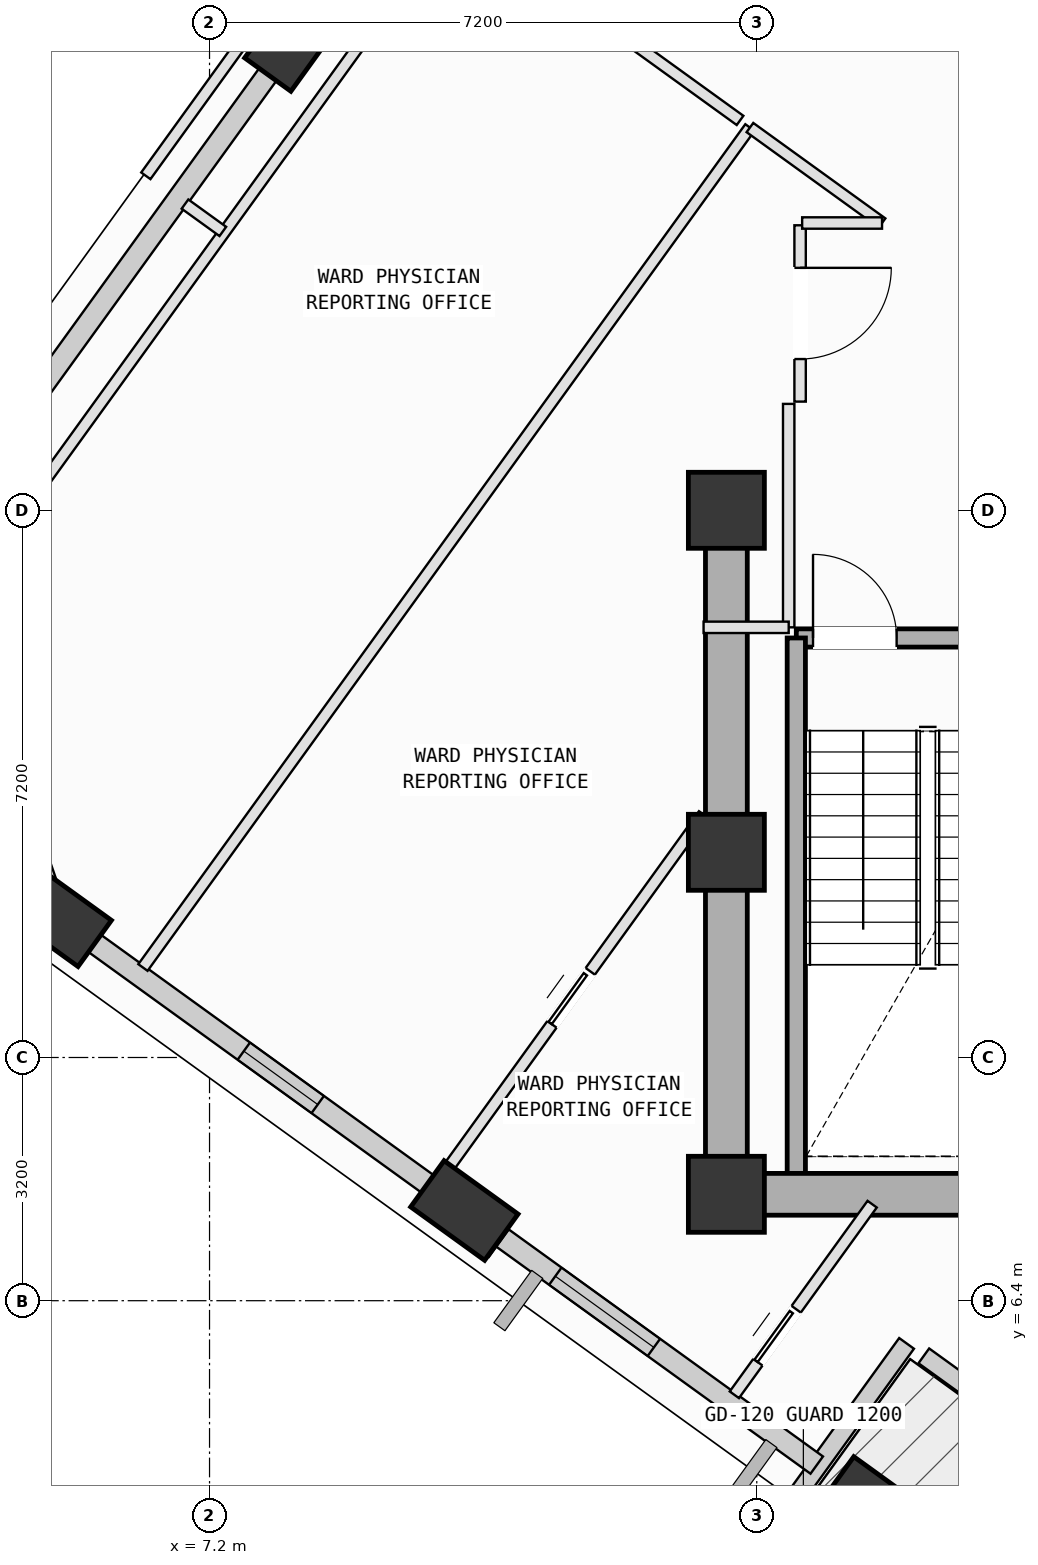
"""IFC4 building model, lengths in metres.
Left out: names, types, materials, properties, quantities, classifications, styles, units other than length and angle.
Written with IfcOpenShell. Run it as: python <this file> out.ifc"""

import sys

from ifc_helpers import new_model, si_unit, direction, frame, frame_2d, origin, origin_2d, place, context, subcontext, project, spatial, rectangle, extrude, element, fill, save


model = new_model("IFC4")
c1 = context("Model", 3, precision=1e-05, world=origin(), true_north=direction((0.0, 1.0)))
c2 = subcontext(c1, "Body", "Model", "MODEL_VIEW")
j1 = project(units=[si_unit("LENGTHUNIT", "METRE"), si_unit("PLANEANGLEUNIT", "RADIAN")], contexts=[c1])
p1 = place(None, origin())
s1 = spatial("IfcSite", under=j1, at=p1, CompositionType="ELEMENT")
p2 = place(p1, origin())
s2 = spatial("IfcBuilding", under=s1, at=p2, CompositionType="ELEMENT")
p3 = place(p2, frame((0.0, 0.0, 255.2)))
s3 = spatial("IfcBuildingStorey", under=s2, at=p3, CompositionType="ELEMENT", Elevation=255.2)
for number, where, z_axis, x_axis in (
    (1, (14.0, 7.8, 0.0), (0.0, 0.0, 1.0), (1.0, 0.0, 0.0)),
    (2, (14.0, 12.3, 0.0), (0.0, 0.0, 1.0), (1.0, 0.0, 0.0)),
    (3, (14.0, 16.8, 0.0), (0.0, 0.0, 1.0), (1.0, 0.0, 0.0)),
):
    element("IfcColumn", number, at=place(p3, frame(where, z_axis=z_axis, x_axis=x_axis)), inside=s3, PredefinedType="COLUMN", context=c2, shape_type="SweptSolid", body=[
        extrude(rectangle(XDim=1.0, YDim=1.0, at=origin_2d()), origin(), (0.0, 0.0, 1.0), 4.0),
    ])
p4 = place(p3, frame((8.318, 23.02, 0.002), z_axis=(0.008202176681, -0.10413726542, 0.994529111816), x_axis=(0.520560631231, 0.849616141392, 0.084670192506)))
e4 = element("IfcColumn", 4, at=p4, inside=s3, PredefinedType="COLUMN", context=c2, shape_type="SweptSolid", body=[
    extrude(rectangle(XDim=1.2, YDim=0.75, at=origin_2d()), origin(), (0.0, 0.0, 1.0), 4.018),
])
p5 = place(p3, frame((5.203, 11.452, 0.002), z_axis=(0.055855526664, -0.116254615693, 0.991647631203), x_axis=(-0.98211534436, 0.172463303398, 0.075537138904)))
e5 = element("IfcColumn", 5, at=p5, inside=s3, PredefinedType="COLUMN", context=c2, shape_type="SweptSolid", body=[
    extrude(rectangle(XDim=1.2, YDim=0.75, at=origin_2d()), origin(), (0.0, 0.0, 1.0), 4.03),
])
p6 = place(p3, frame((10.553, 7.587, 0.002), z_axis=(0.071580718062, -0.094268165991, 0.992970147428), x_axis=(-0.997228265917, -0.02702229823, 0.069322298389)))
e6 = element("IfcColumn", 6, at=p6, inside=s3, PredefinedType="COLUMN", context=c2, shape_type="SweptSolid", body=[
    extrude(rectangle(XDim=1.2, YDim=0.75, at=origin_2d()), origin(), (0.0, 0.0, 1.0), 4.025),
])
p7 = place(p3, frame((15.943, 3.692, 0.002), z_axis=(0.087525830484, -0.071987264184, 0.993557780299), x_axis=(-0.964292743084, -0.256387070129, 0.066371499197)))
e7 = element("IfcColumn", 7, at=p7, inside=s3, PredefinedType="COLUMN", context=c2, shape_type="SweptSolid", body=[
    extrude(rectangle(XDim=1.2, YDim=0.75, at=origin_2d()), origin(), (0.0, 0.0, 1.0), 4.022),
])
p8 = place(p3, frame((22.239, 1.598, 0.0), z_axis=(0.0, 0.0, 1.0), x_axis=(-0.810564518145, 0.585649350656, 0.0)))
e8 = element("IfcWall", 8, at=p8, inside=s3, PredefinedType="SOLIDWALL", context=c2, shape_type="SweptSolid", body=[
    extrude(rectangle(XDim=6.96, YDim=0.24, at=frame_2d((3.48, 0.0))), origin(), (0.0, 0.0, 1.0), 3.265),
])
p9 = place(p8, frame((2.485, 0.0, 0.0)))
e9 = element("IfcOpeningElement", 9, at=p9, cuts=e8, PredefinedType="OPENING", context=c2, shape_type="SweptSolid", body=[
    extrude(rectangle(XDim=1.1, YDim=2.15, at=frame_2d((0.55, 1.075))), frame((0.0, 0.13, 0.0), z_axis=(0.0, -1.0, 0.0), x_axis=(1.0, 0.0, 0.0)), (0.0, 0.0, 1.0), 0.26),
])
p10 = place(p3, frame((16.371, 5.838, 0.0), z_axis=(0.0, 0.0, 1.0), x_axis=(-0.585718716233, -0.810514395587, 0.0)))
e10 = element("IfcWall", 10, at=p10, inside=s3, PredefinedType="SOLIDWALL", context=c2, shape_type="SweptSolid", body=[
    extrude(rectangle(XDim=2.5, YDim=0.24, at=frame_2d((1.25, 0.0))), origin(), (0.0, 0.0, 1.0), 3.265),
])
p11 = place(p3, frame((3.622, 16.521, 0.0), z_axis=(0.0, 0.0, 1.0), x_axis=(0.585672755105, 0.810547607441, 0.0)))
e11 = element("IfcWall", 11, at=p11, inside=s3, PredefinedType="SOLIDWALL", context=c2, shape_type="SweptSolid", body=[
    extrude(rectangle(XDim=7.485, YDim=0.28, at=frame_2d((3.742, 0.0))), origin(), (0.0, 0.0, 1.0), 3.265),
])
p12 = place(p3, frame((5.158, 11.583, 0.0), z_axis=(0.0, 0.0, 1.0), x_axis=(-0.324440430391, 0.945906130188, 0.0)))
e12 = element("IfcWall", 12, at=p12, inside=s3, PredefinedType="SOLIDWALL", context=c2, shape_type="SweptSolid", body=[
    extrude(rectangle(XDim=4.408, YDim=0.28, at=frame_2d((2.204, 0.0))), origin(), (0.0, 0.0, 1.0), 3.265),
])
p13 = place(p3, frame((10.42, 7.683, 0.0), z_axis=(0.0, 0.0, 1.0), x_axis=(-0.810541185411, 0.585681642834, 0.0)))
e13 = element("IfcWall", 13, at=p13, inside=s3, PredefinedType="SOLIDWALL", context=c2, shape_type="SweptSolid", body=[
    extrude(rectangle(XDim=5.831, YDim=0.28, at=frame_2d((2.915, 0.0))), origin(), (0.0, 0.0, 1.0), 3.265),
])
p14 = place(p13, frame((2.217, 0.0, 0.75)))
e14 = element("IfcOpeningElement", 14, at=p14, cuts=e13, PredefinedType="OPENING", context=c2, shape_type="SweptSolid", body=[
    extrude(rectangle(XDim=1.2, YDim=1.75, at=frame_2d((0.6, 0.875))), frame((0.0, 0.15, 0.0), z_axis=(0.0, -1.0, 0.0), x_axis=(1.0, 0.0, 0.0)), (0.0, 0.0, 1.0), 0.3),
])
p15 = place(p3, frame((15.189, 4.237, 0.0), z_axis=(0.0, 0.0, 1.0), x_axis=(-0.810568140664, 0.585644336898, 0.0)))
e15 = element("IfcWall", 15, at=p15, inside=s3, PredefinedType="SOLIDWALL", context=c2, shape_type="SweptSolid", body=[
    extrude(rectangle(XDim=5.101, YDim=0.28, at=frame_2d((2.55, 0.0))), origin(), (0.0, 0.0, 1.0), 3.245),
])
p16 = place(p15, frame((2.644, 0.0, 0.75)))
e16 = element("IfcOpeningElement", 16, at=p16, cuts=e15, PredefinedType="OPENING", context=c2, shape_type="SweptSolid", body=[
    extrude(rectangle(XDim=1.6, YDim=1.95, at=frame_2d((0.8, 0.975))), frame((0.0, 0.15, 0.0), z_axis=(0.0, -1.0, 0.0), x_axis=(1.0, 0.0, 0.0)), (0.0, 0.0, 1.0), 0.3),
])
p17 = place(p3, frame((14.92, 15.12, 0.0), z_axis=(0.0, 0.0, 1.0), x_axis=(1.0, 0.0, 0.0)))
e17 = element("IfcWall", 17, at=p17, inside=s3, PredefinedType="SOLIDWALL", context=c2, shape_type="SweptSolid", body=[
    extrude(rectangle(XDim=3.46, YDim=0.24, at=frame_2d((1.73, 0.0))), origin(), (0.0, 0.0, 1.0), 3.78),
])
p18 = place(p17, frame((0.22, 0.0, 0.0)))
e18 = element("IfcOpeningElement", 18, at=p18, cuts=e17, PredefinedType="OPENING", context=c2, shape_type="SweptSolid", body=[
    extrude(rectangle(XDim=1.1, YDim=2.15, at=frame_2d((0.55, 1.075))), frame((0.0, 0.13, 0.0), z_axis=(0.0, -1.0, 0.0), x_axis=(1.0, 0.0, 0.0)), (0.0, 0.0, 1.0), 0.26),
])
p19 = place(p3, frame((14.92, 8.075, 0.0), z_axis=(0.0, 0.0, 1.0), x_axis=(0.0, 1.0, 0.0)))
e19 = element("IfcWall", 19, at=p19, inside=s3, PredefinedType="SOLIDWALL", context=c2, shape_type="SweptSolid", body=[
    extrude(rectangle(XDim=7.045, YDim=0.24, at=frame_2d((3.522, 0.0))), origin(), (0.0, 0.0, 1.0), 3.78),
])
p20 = place(p3, frame((14.0, 7.8, 0.0), z_axis=(0.0, 0.0, 1.0), x_axis=(1.0, 0.0, 0.0)))
e20 = element("IfcWall", 20, at=p20, inside=s3, PredefinedType="SHEAR", context=c2, shape_type="SweptSolid", body=[
    extrude(rectangle(XDim=10.8, YDim=0.55, at=frame_2d((5.4, 0.0))), origin(), (0.0, 0.0, 1.0), 3.78),
])
p21 = place(p3, frame((14.0, 16.8, 0.0), z_axis=(0.0, 0.0, 1.0), x_axis=(0.0, -1.0, 0.0)))
e21 = element("IfcWall", 21, at=p21, inside=s3, PredefinedType="SHEAR", context=c2, shape_type="SweptSolid", body=[
    extrude(rectangle(XDim=9.0, YDim=0.55, at=frame_2d((4.5, 0.0))), origin(), (0.0, 0.0, 1.0), 3.78),
])
p22 = place(p3, frame((14.105, 5.162, 0.0), z_axis=(0.0, 0.0, 1.0), x_axis=(0.585870719432, 0.810404528684, 0.0)))
e22 = element("IfcWall", 22, at=p22, inside=s3, PredefinedType="PARTITIONING", context=c2, shape_type="SweptSolid", body=[
    extrude(rectangle(XDim=3.094, YDim=0.15, at=frame_2d((1.547, 0.0))), origin(), (0.0, 0.0, 1.0), 3.78),
])
p23 = place(p22, frame((0.529, 0.0, 0.0)))
e23 = element("IfcOpeningElement", 23, at=p23, cuts=e22, PredefinedType="OPENING", context=c2, shape_type="SweptSolid", body=[
    extrude(rectangle(XDim=0.86, YDim=2.06, at=frame_2d((0.43, 1.03))), frame((0.0, 0.085, 0.0), z_axis=(0.0, -1.0, 0.0), x_axis=(1.0, 0.0, 0.0)), (0.0, 0.0, 1.0), 0.17),
])
p24 = place(p3, frame((10.92, 7.038, 0.0), z_axis=(0.0, 0.0, 1.0), x_axis=(-0.810621608794, 0.585570326568, 0.0)))
e24 = element("IfcWall", 24, at=p24, inside=s3, PredefinedType="PARTITIONING", context=c2, shape_type="SweptSolid", body=[
    extrude(rectangle(XDim=0.782, YDim=0.15, at=frame_2d((0.391, 0.0))), origin(), (0.0, 0.0, 1.0), 3.245),
])
p25 = place(p3, frame((10.215, 7.973, 0.0), z_axis=(0.0, 0.0, 1.0), x_axis=(0.585568437411, 0.810622973465, 0.0)))
e25 = element("IfcWall", 25, at=p25, inside=s3, PredefinedType="PARTITIONING", context=c2, shape_type="SweptSolid", body=[
    extrude(rectangle(XDim=5.951, YDim=0.15, at=frame_2d((2.976, 0.0))), origin(), (0.0, 0.0, 1.0), 3.78),
])
p26 = place(p25, frame((2.546, 0.0, 0.0)))
e26 = element("IfcOpeningElement", 26, at=p26, cuts=e25, PredefinedType="OPENING", context=c2, shape_type="SweptSolid", body=[
    extrude(rectangle(XDim=0.86, YDim=2.06, at=frame_2d((0.43, 1.03))), frame((0.0, 0.085, 0.0), z_axis=(0.0, -1.0, 0.0), x_axis=(1.0, 0.0, 0.0)), (0.0, 0.0, 1.0), 0.17),
])
p27 = place(p3, frame((14.97, 20.55, 0.0), z_axis=(0.0, 0.0, 1.0), x_axis=(0.0, -1.0, 0.0)))
e27 = element("IfcWall", 27, at=p27, inside=s3, PredefinedType="PARTITIONING", context=c2, shape_type="SweptSolid", body=[
    extrude(rectangle(XDim=2.32, YDim=0.15, at=frame_2d((1.16, 0.0))), origin(), (0.0, 0.0, 1.0), 3.78),
])
p28 = place(p27, frame((0.56, 0.0, 0.0)))
e28 = element("IfcOpeningElement", 28, at=p28, cuts=e27, PredefinedType="OPENING", context=c2, shape_type="SweptSolid", body=[
    extrude(rectangle(XDim=1.2, YDim=2.15, at=frame_2d((0.6, 1.075))), frame((0.0, 0.085, 0.0), z_axis=(0.0, -1.0, 0.0), x_axis=(1.0, 0.0, 0.0)), (0.0, 0.0, 1.0), 0.17),
])
p29 = place(p3, frame((14.82, 18.2, 0.0), z_axis=(0.0, 0.0, 1.0), x_axis=(0.0, -1.0, 0.0)))
e29 = element("IfcWall", 29, at=p29, inside=s3, PredefinedType="PARTITIONING", context=c2, shape_type="SweptSolid", body=[
    extrude(rectangle(XDim=2.94, YDim=0.15, at=frame_2d((1.47, 0.0))), origin(), (0.0, 0.0, 1.0), 3.78),
])
p30 = place(p3, frame((14.82, 15.26, 0.0), z_axis=(0.0, 0.0, 1.0), x_axis=(-1.0, 0.0, 0.0)))
e30 = element("IfcWall", 30, at=p30, inside=s3, PredefinedType="PARTITIONING", context=c2, shape_type="SweptSolid", body=[
    extrude(rectangle(XDim=1.12, YDim=0.15, at=frame_2d((0.56, 0.0))), origin(), (0.0, 0.0, 1.0), 3.78),
])
p31 = place(p3, frame((6.324, 10.784, 0.0), z_axis=(0.0, 0.0, 1.0), x_axis=(0.585687308948, 0.810537091155, 0.0)))
e31 = element("IfcWall", 31, at=p31, inside=s3, PredefinedType="PARTITIONING", context=c2, shape_type="SweptSolid", body=[
    extrude(rectangle(XDim=13.635, YDim=0.15, at=frame_2d((6.818, 0.0))), origin(), (0.0, 0.0, 1.0), 3.78),
])
p32 = place(p3, frame((14.31, 21.836, 0.0), z_axis=(0.0, 0.0, 1.0), x_axis=(0.810544103315, -0.585677604643, 0.0)))
e32 = element("IfcWall", 32, at=p32, inside=s3, PredefinedType="PARTITIONING", context=c2, shape_type="SweptSolid", body=[
    extrude(rectangle(XDim=2.144, YDim=0.15, at=frame_2d((1.072, 0.0))), origin(), (0.0, 0.0, 1.0), 3.78),
])
p33 = place(p3, frame((16.048, 20.58, 0.0), z_axis=(0.0, 0.0, 1.0), x_axis=(-1.0, 0.0, 0.0)))
e33 = element("IfcWall", 33, at=p33, inside=s3, PredefinedType="PARTITIONING", context=c2, shape_type="SweptSolid", body=[
    extrude(rectangle(XDim=1.051, YDim=0.15, at=frame_2d((0.525, 0.0))), origin(), (0.0, 0.0, 1.0), 3.78),
])
p34 = place(p3, frame((3.896, 15.619, 0.0), z_axis=(0.0, 0.0, 1.0), x_axis=(0.585648203919, 0.810565346685, 0.0)))
e34 = element("IfcWall", 34, at=p34, inside=s3, PredefinedType="PARTITIONING", context=c2, shape_type="SweptSolid", body=[
    extrude(rectangle(XDim=11.138, YDim=0.15, at=frame_2d((5.569, 0.0))), origin(), (0.0, 0.0, 1.0), 3.265),
])
p35 = place(p3, frame((10.419, 24.647, 0.0), z_axis=(0.0, 0.0, 1.0), x_axis=(0.810600131972, -0.585600056392, 0.0)))
e35 = element("IfcWall", 35, at=p35, inside=s3, PredefinedType="PARTITIONING", context=c2, shape_type="SweptSolid", body=[
    extrude(rectangle(XDim=4.64, YDim=0.15, at=frame_2d((2.32, 0.0))), origin(), (0.0, 0.0, 1.0), 3.78),
])
p36 = place(p35, frame((1.72, 0.0, 0.0)))
e36 = element("IfcOpeningElement", 36, at=p36, cuts=e35, PredefinedType="OPENING", context=c2, shape_type="SweptSolid", body=[
    extrude(rectangle(XDim=1.2, YDim=2.15, at=frame_2d((0.6, 1.075))), frame((0.0, 0.085, 0.0), z_axis=(0.0, -1.0, 0.0), x_axis=(1.0, 0.0, 0.0)), (0.0, 0.0, 1.0), 0.17),
])
p37 = place(p3, frame((5.559, 10.911, 0.0), z_axis=(0.0, 0.0, 1.0), x_axis=(-0.810540070568, 0.585683185693, 0.0)))
e37 = element("IfcWall", 37, at=p37, inside=s3, PredefinedType="PARTITIONING", context=c2, shape_type="SweptSolid", body=[
    extrude(rectangle(XDim=2.406, YDim=0.15, at=frame_2d((1.203, 0.0))), origin(), (0.0, 0.0, 1.0), 3.265),
])
p38 = place(p3, frame((20.307, 21.019, 0.0), z_axis=(0.0, 0.0, 1.0), x_axis=(-0.810596982644, 0.585604415735, 0.0)))
e38 = element("IfcWall", 38, at=p38, inside=s3, PredefinedType="PARTITIONING", context=c2, shape_type="SweptSolid", body=[
    extrude(rectangle(XDim=5.48, YDim=0.15, at=frame_2d((2.74, 0.0))), origin(), (0.0, 0.0, 1.0), 3.415),
])
p39 = place(p38, frame((2.28, 0.0, 0.0)))
e39 = element("IfcOpeningElement", 39, at=p39, cuts=e38, PredefinedType="OPENING", context=c2, shape_type="SweptSolid", body=[
    extrude(rectangle(XDim=0.92, YDim=2.1, at=frame_2d((0.46, 1.05))), frame((0.0, 0.085, 0.0), z_axis=(0.0, -1.0, 0.0), x_axis=(1.0, 0.0, 0.0)), (0.0, 0.0, 1.0), 0.17),
])
p40 = place(p3, frame((7.375, 20.469, 0.0), z_axis=(0.0, 0.0, 1.0), x_axis=(-0.810364866816, 0.585925577723, 0.0)))
e40 = element("IfcWall", 40, at=p40, inside=s3, PredefinedType="PARTITIONING", context=c2, shape_type="SweptSolid", body=[
    extrude(rectangle(XDim=0.615, YDim=0.15, at=frame_2d((0.307, 0.0))), origin(), (0.0, 0.0, 1.0), 3.78),
])
p41 = place(p3, frame((6.362, 21.201, 0.0), z_axis=(0.0, 0.0, 1.0), x_axis=(0.585603930262, 0.810597333367, 0.0)))
e41 = element("IfcWall", 41, at=p41, inside=s3, PredefinedType="PARTITIONING", context=c2, shape_type="SweptSolid", body=[
    extrude(rectangle(XDim=5.739, YDim=0.15, at=frame_2d((2.87, 0.0))), origin(), (0.0, 0.0, 1.0), 3.78),
])
p42 = place(p14, origin())
e42 = element("IfcWindow", 42, at=p42, inside=s3, PartitioningType="SINGLE_PANEL", PredefinedType="WINDOW", context=c2, shape_type="SweptSolid", body=[
    extrude(rectangle(XDim=1.2, YDim=1.75, at=frame_2d((0.6, 0.875))), frame((0.0, 0.03, 0.0), z_axis=(0.0, -1.0, 0.0), x_axis=(1.0, 0.0, 0.0)), (0.0, 0.0, 1.0), 0.06),
])
fill(e14, e42)
p43 = place(p16, origin())
e43 = element("IfcWindow", 43, at=p43, inside=s3, PartitioningType="SINGLE_PANEL", PredefinedType="WINDOW", context=c2, shape_type="SweptSolid", body=[
    extrude(rectangle(XDim=1.6, YDim=1.95, at=frame_2d((0.8, 0.975))), frame((0.0, 0.03, 0.0), z_axis=(0.0, -1.0, 0.0), x_axis=(1.0, 0.0, 0.0)), (0.0, 0.0, 1.0), 0.06),
])
fill(e16, e43)
p44 = place(p18, origin())
e44 = element("IfcDoor", 44, at=p44, inside=s3, OperationType="SINGLE_SWING_LEFT", PredefinedType="DOOR", context=c2, shape_type="SweptSolid", body=[
    extrude(rectangle(XDim=1.1, YDim=2.15, at=frame_2d((0.55, 1.075))), frame((0.0, 0.025, 0.0), z_axis=(0.0, -1.0, 0.0), x_axis=(1.0, 0.0, 0.0)), (0.0, 0.0, 1.0), 0.05),
])
fill(e18, e44)
p45 = place(p28, origin())
e45 = element("IfcDoor", 45, at=p45, inside=s3, OperationType="SINGLE_SWING_LEFT", PredefinedType="DOOR", context=c2, shape_type="SweptSolid", body=[
    extrude(rectangle(XDim=1.2, YDim=2.15, at=frame_2d((0.6, 1.075))), frame((0.0, 0.025, 0.0), z_axis=(0.0, -1.0, 0.0), x_axis=(1.0, 0.0, 0.0)), (0.0, 0.0, 1.0), 0.05),
])
fill(e28, e45)
p46 = place(p26, origin())
e46 = element("IfcDoor", 46, at=p46, inside=s3, OperationType="SLIDING_TO_LEFT", PredefinedType="DOOR", context=c2, shape_type="SweptSolid", body=[
    extrude(rectangle(XDim=0.86, YDim=2.06, at=frame_2d((0.43, 1.03))), frame((0.0, 0.025, 0.0), z_axis=(0.0, -1.0, 0.0), x_axis=(1.0, 0.0, 0.0)), (0.0, 0.0, 1.0), 0.05),
])
fill(e26, e46)
p47 = place(p23, origin())
e47 = element("IfcDoor", 47, at=p47, inside=s3, OperationType="SLIDING_TO_LEFT", PredefinedType="DOOR", context=c2, shape_type="SweptSolid", body=[
    extrude(rectangle(XDim=0.86, YDim=2.06, at=frame_2d((0.43, 1.03))), frame((0.0, 0.025, 0.0), z_axis=(0.0, -1.0, 0.0), x_axis=(1.0, 0.0, 0.0)), (0.0, 0.0, 1.0), 0.05),
])
fill(e23, e47)
save(model, sys.argv[1])
